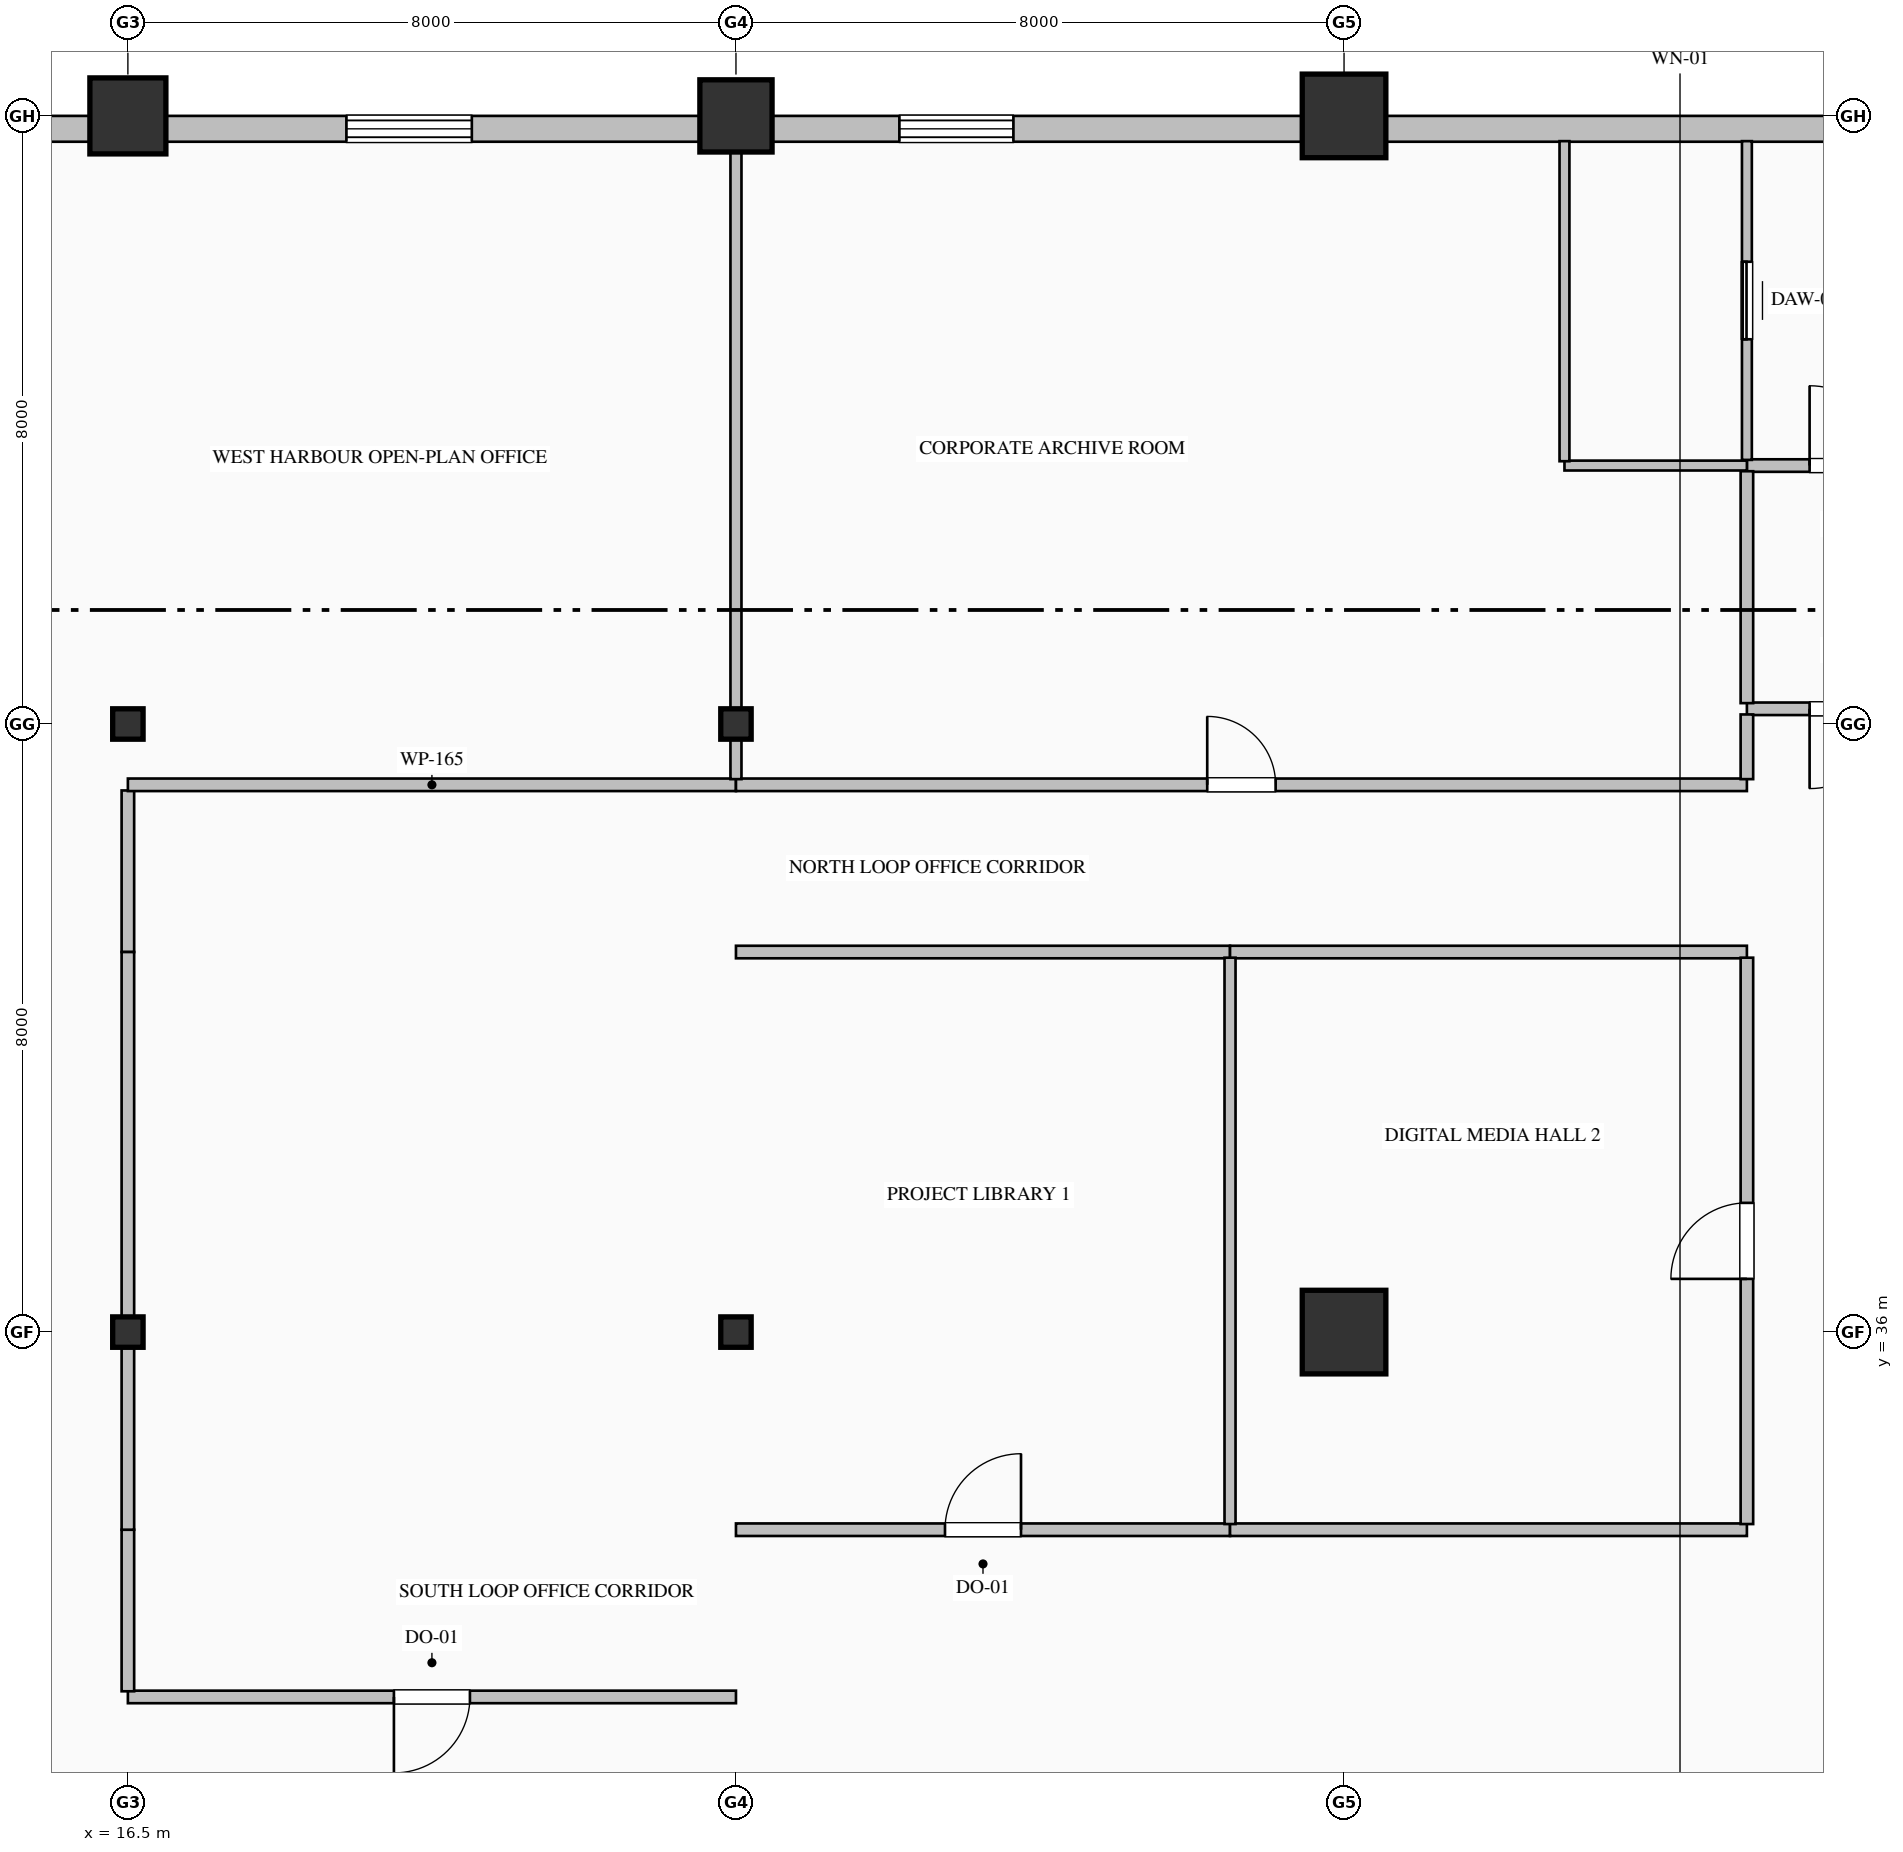
"""IFC4 building model, lengths in metres.
Left out: names, types, materials, properties, quantities, classifications, styles, units other than length and angle.
Written with IfcOpenShell. Run it as: python <this file> out.ifc"""

import sys

from ifc_helpers import new_model, si_unit, direction, frame, frame_2d, origin, origin_2d, place, context, subcontext, project, spatial, rectangle, hollow_rectangle, hollow_circle, i_section, extrude, element, fill, save


model = new_model("IFC4")
c1 = context("Model", 3, precision=1e-05, world=origin(), true_north=direction((0.0, 1.0)))
c2 = subcontext(c1, "Body", "Model", "MODEL_VIEW")
j1 = project(units=[si_unit("LENGTHUNIT", "METRE"), si_unit("PLANEANGLEUNIT", "RADIAN")], contexts=[c1])
p1 = place(None, origin())
s1 = spatial("IfcSite", under=j1, at=p1, CompositionType="ELEMENT")
p2 = place(p1, origin())
s2 = spatial("IfcBuilding", under=s1, at=p2, CompositionType="ELEMENT")
p3 = place(p2, frame((0.0, 0.0, 143.0)))
s3 = spatial("IfcBuildingStorey", under=s2, at=p3, CompositionType="ELEMENT", Elevation=143.0)
for number, where, z_axis, x_axis in (
    (1, (16.5, 36.0, 0.0), (0.0, 0.0, 1.0), (1.0, 0.0, 0.0)),
    (2, (16.5, 44.0, 0.0), (0.0, 0.0, 1.0), (1.0, 0.0, 0.0)),
):
    element("IfcColumn", number, at=place(p3, frame(where, z_axis=z_axis, x_axis=x_axis)), inside=s3, PredefinedType="COLUMN", context=c2, shape_type="SweptSolid", body=[
        extrude(i_section(OverallWidth=0.4, OverallDepth=0.4, WebThickness=0.013, FlangeThickness=0.021, FilletRadius=0.022, at=origin_2d()), origin(), (0.0, 0.0, 1.0), 4.0),
    ])
p4 = place(p3, frame((16.5, 52.0, 0.0), z_axis=(0.0, 0.0, 1.0), x_axis=(1.0, 0.0, 0.0)))
e3 = element("IfcColumn", 3, at=p4, inside=s3, PredefinedType="COLUMN", context=c2, shape_type="SweptSolid", body=[
    extrude(hollow_circle(Radius=0.5, WallThickness=0.036, at=origin_2d()), origin(), (0.0, 0.0, 1.0), 4.0),
])
for number, where, z_axis, x_axis in (
    (4, (24.5, 36.0, 0.0), (0.0, 0.0, 1.0), (1.0, 0.0, 0.0)),
    (5, (24.5, 44.0, 0.0), (0.0, 0.0, 1.0), (1.0, 0.0, 0.0)),
):
    element("IfcColumn", number, at=place(p3, frame(where, z_axis=z_axis, x_axis=x_axis)), inside=s3, PredefinedType="COLUMN", context=c2, shape_type="SweptSolid", body=[
        extrude(i_section(OverallWidth=0.4, OverallDepth=0.4, WebThickness=0.013, FlangeThickness=0.021, FilletRadius=0.022, at=origin_2d()), origin(), (0.0, 0.0, 1.0), 4.0),
    ])
p5 = place(p3, frame((24.5, 52.0, 0.0), z_axis=(0.0, 0.0, 1.0), x_axis=(1.0, 0.0, 0.0)))
e6 = element("IfcColumn", 6, at=p5, inside=s3, PredefinedType="COLUMN", context=c2, shape_type="SweptSolid", body=[
    extrude(hollow_rectangle(XDim=0.95, YDim=0.95, WallThickness=0.036, at=origin_2d()), origin(), (0.0, 0.0, 1.0), 4.0),
])
for number, where, z_axis, x_axis in (
    (7, (32.5, 36.0, 0.0), (0.0, 0.0, 1.0), (1.0, 0.0, 0.0)),
    (8, (32.5, 52.0, 0.0), (0.0, 0.0, 1.0), (1.0, 0.0, 0.0)),
):
    element("IfcColumn", number, at=place(p3, frame(where, z_axis=z_axis, x_axis=x_axis)), inside=s3, PredefinedType="COLUMN", context=c2, shape_type="SweptSolid", body=[
        extrude(hollow_rectangle(XDim=1.1, YDim=1.1, WallThickness=0.04, at=origin_2d()), origin(), (0.0, 0.0, 1.0), 4.0),
    ])
p6 = place(p3, frame((13.0, 51.83, 0.0), z_axis=(0.0, 0.0, 1.0), x_axis=(1.0, 0.0, 0.0)))
e9 = element("IfcWall", 9, at=p6, inside=s3, PredefinedType="SOLIDWALL", context=c2, shape_type="SweptSolid", body=[
    extrude(rectangle(XDim=27.52, YDim=0.34, at=frame_2d((13.76, 0.0))), origin(), (0.0, 0.0, 1.0), 3.265),
])
p7 = place(p6, frame((6.375, 0.0, 0.85)))
e10 = element("IfcOpeningElement", 10, at=p7, cuts=e9, PredefinedType="OPENING", context=c2, shape_type="SweptSolid", body=[
    extrude(rectangle(XDim=1.65, YDim=1.95, at=frame_2d((0.825, 0.975))), frame((0.0, 0.18, 0.0), z_axis=(0.0, -1.0, 0.0), x_axis=(1.0, 0.0, 0.0)), (0.0, 0.0, 1.0), 0.36),
])
p8 = place(p6, frame((13.65, 0.0, 0.85)))
e11 = element("IfcOpeningElement", 11, at=p8, cuts=e9, PredefinedType="OPENING", context=c2, shape_type="SweptSolid", body=[
    extrude(rectangle(XDim=1.5, YDim=1.95, at=frame_2d((0.75, 0.975))), frame((0.0, 0.18, 0.0), z_axis=(0.0, -1.0, 0.0), x_axis=(1.0, 0.0, 0.0)), (0.0, 0.0, 1.0), 0.36),
])
p9 = place(p3, frame((37.8, 47.4, 0.0), z_axis=(0.0, 0.0, 1.0), x_axis=(1.0, 0.0, 0.0)))
e12 = element("IfcWall", 12, at=p9, inside=s3, PredefinedType="PARTITIONING", context=c2, shape_type="SweptSolid", body=[
    extrude(rectangle(XDim=2.7, YDim=0.165, at=frame_2d((1.35, 0.0))), origin(), (0.0, 0.0, 1.0), 3.765),
])
p10 = place(p9, frame((0.825, 0.0, 0.0)))
e13 = element("IfcOpeningElement", 13, at=p10, cuts=e12, PredefinedType="OPENING", context=c2, shape_type="SweptSolid", body=[
    extrude(rectangle(XDim=1.05, YDim=2.15, at=frame_2d((0.525, 1.075))), frame((0.0, 0.093, 0.0), z_axis=(0.0, -1.0, 0.0), x_axis=(1.0, 0.0, 0.0)), (0.0, 0.0, 1.0), 0.185),
])
p11 = place(p3, frame((40.5, 44.2, 0.0), z_axis=(0.0, 0.0, 1.0), x_axis=(-1.0, 0.0, 0.0)))
e14 = element("IfcWall", 14, at=p11, inside=s3, PredefinedType="PARTITIONING", context=c2, shape_type="SweptSolid", body=[
    extrude(rectangle(XDim=2.7, YDim=0.165, at=frame_2d((1.35, 0.0))), origin(), (0.0, 0.0, 1.0), 3.765),
])
p12 = place(p11, frame((0.825, 0.0, 0.0)))
e15 = element("IfcOpeningElement", 15, at=p12, cuts=e14, PredefinedType="OPENING", context=c2, shape_type="SweptSolid", body=[
    extrude(rectangle(XDim=1.05, YDim=2.15, at=frame_2d((0.525, 1.075))), frame((0.0, 0.093, 0.0), z_axis=(0.0, -1.0, 0.0), x_axis=(1.0, 0.0, 0.0)), (0.0, 0.0, 1.0), 0.185),
])
p13 = place(p3, frame((37.8, 44.274, 0.0), z_axis=(0.0, 0.0, 1.0), x_axis=(0.0, 1.0, 0.0)))
e16 = element("IfcWall", 16, at=p13, inside=s3, PredefinedType="PARTITIONING", context=c2, shape_type="SweptSolid", body=[
    extrude(rectangle(XDim=3.051, YDim=0.165, at=frame_2d((1.525, 0.0))), origin(), (0.0, 0.0, 1.0), 3.765),
])
p14 = place(p3, frame((37.8, 47.475, 0.0), z_axis=(0.0, 0.0, 1.0), x_axis=(0.0, 1.0, 0.0)))
e17 = element("IfcWall", 17, at=p14, inside=s3, PredefinedType="PARTITIONING", context=c2, shape_type="SweptSolid", body=[
    extrude(rectangle(XDim=4.193, YDim=0.13, at=frame_2d((2.097, 0.0))), origin(), (0.0, 0.0, 1.0), 3.765),
])
p15 = place(p14, frame((1.587, 0.0, 0.0)))
e18 = element("IfcOpeningElement", 18, at=p15, cuts=e17, PredefinedType="OPENING", context=c2, shape_type="SweptSolid", body=[
    extrude(rectangle(XDim=1.02, YDim=2.15, at=frame_2d((0.51, 1.075))), frame((0.0, 0.075, 0.0), z_axis=(0.0, -1.0, 0.0), x_axis=(1.0, 0.0, 0.0)), (0.0, 0.0, 1.0), 0.15),
])
p16 = place(p3, frame((37.8, 47.4, 0.0), z_axis=(0.0, 0.0, 1.0), x_axis=(-1.0, 0.0, 0.0)))
e19 = element("IfcWall", 19, at=p16, inside=s3, PredefinedType="PARTITIONING", context=c2, shape_type="SweptSolid", body=[
    extrude(rectangle(XDim=2.4, YDim=0.13, at=frame_2d((1.2, 0.0))), origin(), (0.0, 0.0, 1.0), 3.765),
])
p17 = place(p3, frame((35.4, 47.457, 0.0), z_axis=(0.0, 0.0, 1.0), x_axis=(0.0, 1.0, 0.0)))
e20 = element("IfcWall", 20, at=p17, inside=s3, PredefinedType="PARTITIONING", context=c2, shape_type="SweptSolid", body=[
    extrude(rectangle(XDim=4.211, YDim=0.13, at=frame_2d((2.105, 0.0))), origin(), (0.0, 0.0, 1.0), 3.765),
])
p18 = place(p3, frame((24.5, 31.2, 0.0), z_axis=(0.0, 0.0, 1.0), x_axis=(-1.0, 0.0, 0.0)))
e21 = element("IfcWall", 21, at=p18, inside=s3, PredefinedType="PARTITIONING", context=c2, shape_type="SweptSolid", body=[
    extrude(rectangle(XDim=8.0, YDim=0.165, at=frame_2d((4.0, 0.0))), origin(), (0.0, 0.0, 1.0), 3.765),
])
p19 = place(p18, frame((3.5, 0.0, 0.0)))
e22 = element("IfcOpeningElement", 22, at=p19, cuts=e21, PredefinedType="OPENING", context=c2, shape_type="SweptSolid", body=[
    extrude(rectangle(XDim=1.0, YDim=2.15, at=frame_2d((0.5, 1.075))), frame((0.0, 0.093, 0.0), z_axis=(0.0, -1.0, 0.0), x_axis=(1.0, 0.0, 0.0)), (0.0, 0.0, 1.0), 0.185),
])
p20 = place(p3, frame((16.5, 31.274, 0.0), z_axis=(0.0, 0.0, 1.0), x_axis=(0.0, 1.0, 0.0)))
e23 = element("IfcWall", 23, at=p20, inside=s3, PredefinedType="PARTITIONING", context=c2, shape_type="SweptSolid", body=[
    extrude(rectangle(XDim=2.125, YDim=0.165, at=frame_2d((1.063, 0.0))), origin(), (0.0, 0.0, 1.0), 3.157),
])
p21 = place(p3, frame((24.5, 33.4, 0.0), z_axis=(0.0, 0.0, 1.0), x_axis=(1.0, 0.0, 0.0)))
e24 = element("IfcWall", 24, at=p21, inside=s3, PredefinedType="PARTITIONING", context=c2, shape_type="SweptSolid", body=[
    extrude(rectangle(XDim=6.5, YDim=0.165, at=frame_2d((3.25, 0.0))), origin(), (0.0, 0.0, 1.0), 3.765),
])
p22 = place(p21, frame((2.75, 0.0, 0.0)))
e25 = element("IfcOpeningElement", 25, at=p22, cuts=e24, PredefinedType="OPENING", context=c2, shape_type="SweptSolid", body=[
    extrude(rectangle(XDim=1.0, YDim=2.15, at=frame_2d((0.5, 1.075))), frame((0.0, 0.093, 0.0), z_axis=(0.0, -1.0, 0.0), x_axis=(1.0, 0.0, 0.0)), (0.0, 0.0, 1.0), 0.185),
])
p23 = place(p3, frame((31.0, 33.4, 0.0), z_axis=(0.0, 0.0, 1.0), x_axis=(1.0, 0.0, 0.0)))
e26 = element("IfcWall", 26, at=p23, inside=s3, PredefinedType="PARTITIONING", context=c2, shape_type="SweptSolid", body=[
    extrude(rectangle(XDim=6.8, YDim=0.165, at=frame_2d((3.4, 0.0))), origin(), (0.0, 0.0, 1.0), 3.765),
])
p24 = place(p3, frame((16.5, 41.0, 0.0), z_axis=(0.0, 0.0, 1.0), x_axis=(0.0, 1.0, 0.0)))
e27 = element("IfcWall", 27, at=p24, inside=s3, PredefinedType="PARTITIONING", context=c2, shape_type="SweptSolid", body=[
    extrude(rectangle(XDim=2.125, YDim=0.165, at=frame_2d((1.063, 0.0))), origin(), (0.0, 0.0, 1.0), 3.157),
])
p25 = place(p3, frame((16.5, 43.2, 0.0), z_axis=(0.0, 0.0, 1.0), x_axis=(1.0, 0.0, 0.0)))
e28 = element("IfcWall", 28, at=p25, inside=s3, PredefinedType="PARTITIONING", context=c2, shape_type="SweptSolid", body=[
    extrude(rectangle(XDim=8.0, YDim=0.165, at=frame_2d((4.0, 0.0))), origin(), (0.0, 0.0, 1.0), 3.765),
])
p26 = place(p3, frame((24.5, 43.2, 0.0), z_axis=(0.0, 0.0, 1.0), x_axis=(1.0, 0.0, 0.0)))
e29 = element("IfcWall", 29, at=p26, inside=s3, PredefinedType="PARTITIONING", context=c2, shape_type="SweptSolid", body=[
    extrude(rectangle(XDim=13.3, YDim=0.165, at=frame_2d((6.65, 0.0))), origin(), (0.0, 0.0, 1.0), 3.765),
])
p27 = place(p26, frame((6.2, 0.0, 0.0)))
e30 = element("IfcOpeningElement", 30, at=p27, cuts=e29, PredefinedType="OPENING", context=c2, shape_type="SweptSolid", body=[
    extrude(rectangle(XDim=0.9, YDim=2.15, at=frame_2d((0.45, 1.075))), frame((0.0, 0.093, 0.0), z_axis=(0.0, -1.0, 0.0), x_axis=(1.0, 0.0, 0.0)), (0.0, 0.0, 1.0), 0.185),
])
p28 = place(p3, frame((31.0, 41.0, 0.0), z_axis=(0.0, 0.0, 1.0), x_axis=(-1.0, 0.0, 0.0)))
e31 = element("IfcWall", 31, at=p28, inside=s3, PredefinedType="PARTITIONING", context=c2, shape_type="SweptSolid", body=[
    extrude(rectangle(XDim=6.5, YDim=0.165, at=frame_2d((3.25, 0.0))), origin(), (0.0, 0.0, 1.0), 3.765),
])
p29 = place(p3, frame((37.8, 41.0, 0.0), z_axis=(0.0, 0.0, 1.0), x_axis=(-1.0, 0.0, 0.0)))
e32 = element("IfcWall", 32, at=p29, inside=s3, PredefinedType="PARTITIONING", context=c2, shape_type="SweptSolid", body=[
    extrude(rectangle(XDim=6.8, YDim=0.165, at=frame_2d((3.4, 0.0))), origin(), (0.0, 0.0, 1.0), 3.765),
])
p30 = place(p3, frame((16.5, 33.4, 0.0), z_axis=(0.0, 0.0, 1.0), x_axis=(0.0, 1.0, 0.0)))
e33 = element("IfcWall", 33, at=p30, inside=s3, PredefinedType="PARTITIONING", context=c2, shape_type="SweptSolid", body=[
    extrude(rectangle(XDim=7.6, YDim=0.165, at=frame_2d((3.8, 0.0))), origin(), (0.0, 0.0, 1.0), 3.157),
])
p31 = place(p3, frame((37.8, 43.274, 0.0), z_axis=(0.0, 0.0, 1.0), x_axis=(0.0, 1.0, 0.0)))
e34 = element("IfcWall", 34, at=p31, inside=s3, PredefinedType="PARTITIONING", context=c2, shape_type="SweptSolid", body=[
    extrude(rectangle(XDim=0.851, YDim=0.165, at=frame_2d((0.426, 0.0))), origin(), (0.0, 0.0, 1.0), 3.765),
])
p32 = place(p3, frame((37.8, 33.475, 0.0), z_axis=(0.0, 0.0, 1.0), x_axis=(0.0, 1.0, 0.0)))
e35 = element("IfcWall", 35, at=p32, inside=s3, PredefinedType="PARTITIONING", context=c2, shape_type="SweptSolid", body=[
    extrude(rectangle(XDim=7.451, YDim=0.165, at=frame_2d((3.726, 0.0))), origin(), (0.0, 0.0, 1.0), 3.765),
])
p33 = place(p32, frame((3.226, 0.0, 0.0)))
e36 = element("IfcOpeningElement", 36, at=p33, cuts=e35, PredefinedType="OPENING", context=c2, shape_type="SweptSolid", body=[
    extrude(rectangle(XDim=1.0, YDim=2.15, at=frame_2d((0.5, 1.075))), frame((0.0, 0.093, 0.0), z_axis=(0.0, -1.0, 0.0), x_axis=(1.0, 0.0, 0.0)), (0.0, 0.0, 1.0), 0.185),
])
p34 = place(p3, frame((24.5, 51.668, 0.0), z_axis=(0.0, 0.0, 1.0), x_axis=(0.0, -1.0, 0.0)))
e37 = element("IfcWall", 37, at=p34, inside=s3, PredefinedType="PARTITIONING", context=c2, shape_type="SweptSolid", body=[
    extrude(rectangle(XDim=8.394, YDim=0.145, at=frame_2d((4.197, 0.0))), origin(), (0.0, 0.0, 1.0), 3.157),
])
p35 = place(p3, frame((31.0, 40.926, 0.0), z_axis=(0.0, 0.0, 1.0), x_axis=(0.0, -1.0, 0.0)))
e38 = element("IfcWall", 38, at=p35, inside=s3, PredefinedType="PARTITIONING", context=c2, shape_type="SweptSolid", body=[
    extrude(rectangle(XDim=7.451, YDim=0.145, at=frame_2d((3.726, 0.0))), origin(), (0.0, 0.0, 1.0), 3.765),
])
p36 = place(p7, origin())
e39 = element("IfcWindow", 39, at=p36, inside=s3, PartitioningType="DOUBLE_PANEL_VERTICAL", PredefinedType="WINDOW", context=c2, shape_type="SweptSolid", body=[
    extrude(rectangle(XDim=1.65, YDim=1.95, at=frame_2d((0.825, 0.975))), frame((0.0, 0.15, 0.0), z_axis=(0.0, -1.0, 0.0), x_axis=(1.0, 0.0, 0.0)), (0.0, 0.0, 1.0), 0.06),
])
fill(e10, e39)
p37 = place(p8, origin())
e40 = element("IfcWindow", 40, at=p37, inside=s3, PartitioningType="DOUBLE_PANEL_VERTICAL", PredefinedType="WINDOW", context=c2, shape_type="SweptSolid", body=[
    extrude(rectangle(XDim=1.5, YDim=1.95, at=frame_2d((0.75, 0.975))), frame((0.0, 0.15, 0.0), z_axis=(0.0, -1.0, 0.0), x_axis=(1.0, 0.0, 0.0)), (0.0, 0.0, 1.0), 0.06),
])
fill(e11, e40)
p38 = place(p10, origin())
e41 = element("IfcDoor", 41, at=p38, inside=s3, OperationType="SINGLE_SWING_LEFT", PredefinedType="DOOR", context=c2, shape_type="SweptSolid", body=[
    extrude(rectangle(XDim=1.05, YDim=2.15, at=frame_2d((0.525, 1.075))), frame((0.0, 0.025, 0.0), z_axis=(0.0, -1.0, 0.0), x_axis=(1.0, 0.0, 0.0)), (0.0, 0.0, 1.0), 0.05),
])
fill(e13, e41)
p39 = place(p12, origin())
e42 = element("IfcDoor", 42, at=p39, inside=s3, OperationType="SINGLE_SWING_RIGHT", PredefinedType="DOOR", context=c2, shape_type="SweptSolid", body=[
    extrude(rectangle(XDim=1.05, YDim=2.15, at=frame_2d((0.525, 1.075))), frame((0.0, 0.025, 0.0), z_axis=(0.0, -1.0, 0.0), x_axis=(1.0, 0.0, 0.0)), (0.0, 0.0, 1.0), 0.05),
])
fill(e15, e42)
p40 = place(p15, origin())
e43 = element("IfcDoor", 43, at=p40, inside=s3, OperationType="SLIDING_TO_LEFT", PredefinedType="DOOR", context=c2, shape_type="SweptSolid", body=[
    extrude(rectangle(XDim=1.02, YDim=2.15, at=frame_2d((0.51, 1.075))), frame((0.0, 0.025, 0.0), z_axis=(0.0, -1.0, 0.0), x_axis=(1.0, 0.0, 0.0)), (0.0, 0.0, 1.0), 0.05),
])
fill(e18, e43)
p41 = place(p19, origin())
e44 = element("IfcDoor", 44, at=p41, inside=s3, OperationType="SINGLE_SWING_RIGHT", PredefinedType="DOOR", context=c2, shape_type="SweptSolid", body=[
    extrude(rectangle(XDim=1.0, YDim=2.15, at=frame_2d((0.5, 1.075))), frame((0.0, 0.025, 0.0), z_axis=(0.0, -1.0, 0.0), x_axis=(1.0, 0.0, 0.0)), (0.0, 0.0, 1.0), 0.05),
])
fill(e22, e44)
p42 = place(p27, origin())
e45 = element("IfcDoor", 45, at=p42, inside=s3, OperationType="SINGLE_SWING_LEFT", PredefinedType="DOOR", context=c2, shape_type="SweptSolid", body=[
    extrude(rectangle(XDim=0.9, YDim=2.15, at=frame_2d((0.45, 1.075))), frame((0.0, 0.025, 0.0), z_axis=(0.0, -1.0, 0.0), x_axis=(1.0, 0.0, 0.0)), (0.0, 0.0, 1.0), 0.05),
])
fill(e30, e45)
p43 = place(p22, origin())
e46 = element("IfcDoor", 46, at=p43, inside=s3, OperationType="SINGLE_SWING_RIGHT", PredefinedType="DOOR", context=c2, shape_type="SweptSolid", body=[
    extrude(rectangle(XDim=1.0, YDim=2.15, at=frame_2d((0.5, 1.075))), frame((0.0, 0.025, 0.0), z_axis=(0.0, -1.0, 0.0), x_axis=(1.0, 0.0, 0.0)), (0.0, 0.0, 1.0), 0.05),
])
fill(e25, e46)
p44 = place(p33, origin())
e47 = element("IfcDoor", 47, at=p44, inside=s3, OperationType="SINGLE_SWING_LEFT", PredefinedType="DOOR", context=c2, shape_type="SweptSolid", body=[
    extrude(rectangle(XDim=1.0, YDim=2.15, at=frame_2d((0.5, 1.075))), frame((0.0, 0.025, 0.0), z_axis=(0.0, -1.0, 0.0), x_axis=(1.0, 0.0, 0.0)), (0.0, 0.0, 1.0), 0.05),
])
fill(e36, e47)
save(model, sys.argv[1])
